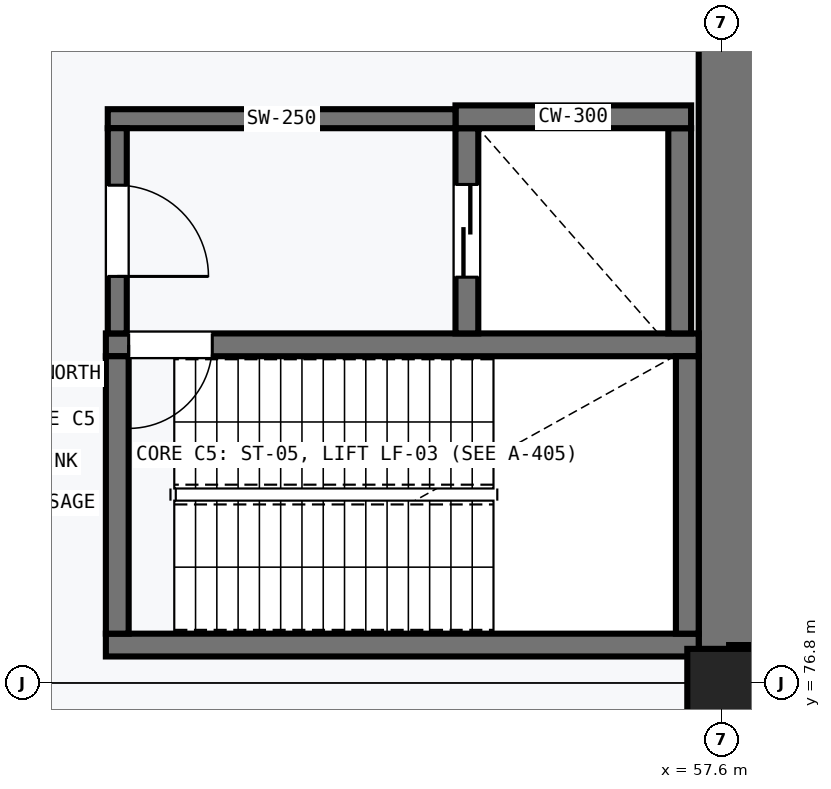
"""IFC4 building model, lengths in metres.
Left out: names, types, materials, properties, quantities, classifications, styles, units other than length and angle.
Written with IfcOpenShell. Run it as: python <this file> out.ifc"""

import sys

from ifc_helpers import new_model, si_unit, direction, frame, frame_2d, origin, origin_2d, place, context, subcontext, project, spatial, rectangle, extrude, element, fill, save


model = new_model("IFC4")
c1 = context("Model", 3, precision=1e-05, world=origin(), true_north=direction((0.0, 1.0)))
c2 = subcontext(c1, "Body", "Model", "MODEL_VIEW")
j1 = project(units=[si_unit("LENGTHUNIT", "METRE"), si_unit("PLANEANGLEUNIT", "RADIAN")], contexts=[c1])
p1 = place(None, origin())
s1 = spatial("IfcSite", under=j1, at=p1, CompositionType="ELEMENT")
p2 = place(p1, origin())
s2 = spatial("IfcBuilding", under=s1, at=p2, CompositionType="ELEMENT")
p3 = place(p2, frame((0.0, 0.0, -5.4)))
s3 = spatial("IfcBuildingStorey", under=s2, at=p3, CompositionType="ELEMENT", Elevation=-5.4)
p4 = place(p3, frame((57.7, 86.5, 0.0), z_axis=(0.0, 0.0, 1.0), x_axis=(0.0, -1.0, 0.0)))
e1 = element("IfcWall", 1, at=p4, inside=s3, PredefinedType="SOLIDWALL", context=c2, shape_type="SweptSolid", body=[
    extrude(rectangle(XDim=9.6, YDim=0.8, at=frame_2d((4.8, 0.0))), origin(), (0.0, 0.0, 1.0), 5.0),
])
p5 = place(p3, frame((57.7, 76.9, 0.0), z_axis=(0.0, 0.0, 1.0), x_axis=(1.0, 0.0, 0.0)))
e2 = element("IfcWall", 2, at=p5, inside=s3, PredefinedType="SOLIDWALL", context=c2, shape_type="SweptSolid", body=[
    extrude(rectangle(XDim=96.0, YDim=0.8, at=frame_2d((48.0, 0.0))), origin(), (0.0, 0.0, 1.0), 5.0),
])
p6 = place(p3, frame((57.6, 76.8, 0.0), z_axis=(0.0, 0.0, 1.0), x_axis=(1.0, 0.0, 0.0)))
e3 = element("IfcColumn", 3, at=p6, inside=s3, PredefinedType="COLUMN", context=c2, shape_type="SweptSolid", body=[
    extrude(rectangle(XDim=0.9, YDim=0.9, at=origin_2d()), origin(), (0.0, 0.0, 1.0), 5.0),
])
p7 = place(p3, frame((49.5, 77.3, 0.0), z_axis=(0.0, 0.0, 1.0), x_axis=(1.0, 0.0, 0.0)))
e4 = element("IfcWall", 4, at=p7, inside=s3, PredefinedType="SHEAR", context=c2, shape_type="SweptSolid", body=[
    extrude(rectangle(XDim=7.8, YDim=0.3, at=frame_2d((3.9, 0.0))), origin(), (0.0, 0.0, 1.0), 5.0),
])
p8 = place(p3, frame((57.3, 81.25, 0.0), z_axis=(0.0, 0.0, 1.0), x_axis=(-1.0, 0.0, 0.0)))
e5 = element("IfcWall", 5, at=p8, inside=s3, PredefinedType="SHEAR", context=c2, shape_type="SweptSolid", body=[
    extrude(rectangle(XDim=7.8, YDim=0.3, at=frame_2d((3.9, 0.0))), origin(), (0.0, 0.0, 1.0), 5.0),
])
p9 = place(p8, frame((6.4, 0.0, 0.0)))
e6 = element("IfcOpeningElement", 6, at=p9, cuts=e5, PredefinedType="OPENING", context=c2, shape_type="SweptSolid", body=[
    extrude(rectangle(XDim=1.1, YDim=2.15, at=frame_2d((0.55, 1.075))), frame((0.0, 0.16, 0.0), z_axis=(0.0, -1.0, 0.0), x_axis=(1.0, 0.0, 0.0)), (0.0, 0.0, 1.0), 0.32),
])
for number, where, z_axis, x_axis in (
    (7, (49.65, 77.45, 0.0), (0.0, 0.0, 1.0), (0.0, 1.0, 0.0)),
    (8, (57.15, 81.1, 0.0), (0.0, 0.0, 1.0), (0.0, -1.0, 0.0)),
):
    element("IfcWall", number, at=place(p3, frame(where, z_axis=z_axis, x_axis=x_axis)), inside=s3, PredefinedType="SHEAR", context=c2, shape_type="SweptSolid", body=[
        extrude(rectangle(XDim=3.65, YDim=0.3, at=frame_2d((1.825, 0.0))), origin(), (0.0, 0.0, 1.0), 5.0),
    ])
p10 = place(p3, frame((54.25, 84.1, 0.0), z_axis=(0.0, 0.0, 1.0), x_axis=(0.0, -1.0, 0.0)))
e9 = element("IfcWall", 9, at=p10, inside=s3, PredefinedType="SHEAR", context=c2, shape_type="SweptSolid", body=[
    extrude(rectangle(XDim=2.7, YDim=0.3, at=frame_2d((1.35, 0.0))), origin(), (0.0, 0.0, 1.0), 5.0),
])
p11 = place(p10, frame((0.74, 0.0, 0.0)))
e10 = element("IfcOpeningElement", 10, at=p11, cuts=e9, PredefinedType="OPENING", context=c2, shape_type="SweptSolid", body=[
    extrude(rectangle(XDim=1.22, YDim=2.15, at=frame_2d((0.61, 1.075))), frame((0.0, 0.16, 0.0), z_axis=(0.0, -1.0, 0.0), x_axis=(1.0, 0.0, 0.0)), (0.0, 0.0, 1.0), 0.32),
])
p12 = place(p3, frame((57.05, 81.4, 0.0), z_axis=(0.0, 0.0, 1.0), x_axis=(0.0, 1.0, 0.0)))
e11 = element("IfcWall", 11, at=p12, inside=s3, PredefinedType="SHEAR", context=c2, shape_type="SweptSolid", body=[
    extrude(rectangle(XDim=2.7, YDim=0.3, at=frame_2d((1.35, 0.0))), origin(), (0.0, 0.0, 1.0), 5.0),
])
p13 = place(p3, frame((54.1, 84.25, 0.0), z_axis=(0.0, 0.0, 1.0), x_axis=(1.0, 0.0, 0.0)))
e12 = element("IfcWall", 12, at=p13, inside=s3, PredefinedType="SHEAR", context=c2, shape_type="SweptSolid", body=[
    extrude(rectangle(XDim=3.1, YDim=0.3, at=frame_2d((1.55, 0.0))), origin(), (0.0, 0.0, 1.0), 5.0),
])
p14 = place(p3, frame((54.1, 84.225, 0.0), z_axis=(0.0, 0.0, 1.0), x_axis=(-1.0, 0.0, 0.0)))
e13 = element("IfcWall", 13, at=p14, inside=s3, PredefinedType="SHEAR", context=c2, shape_type="SweptSolid", body=[
    extrude(rectangle(XDim=4.575, YDim=0.25, at=frame_2d((2.288, 0.0))), origin(), (0.0, 0.0, 1.0), 5.0),
])
p15 = place(p3, frame((49.65, 81.4, 0.0), z_axis=(0.0, 0.0, 1.0), x_axis=(0.0, 1.0, 0.0)))
e14 = element("IfcWall", 14, at=p15, inside=s3, PredefinedType="SHEAR", context=c2, shape_type="SweptSolid", body=[
    extrude(rectangle(XDim=2.7, YDim=0.25, at=frame_2d((1.35, 0.0))), origin(), (0.0, 0.0, 1.0), 5.0),
])
p16 = place(p15, frame((0.75, 0.0, 0.0)))
e15 = element("IfcOpeningElement", 15, at=p16, cuts=e14, PredefinedType="OPENING", context=c2, shape_type="SweptSolid", body=[
    extrude(rectangle(XDim=1.2, YDim=2.15, at=frame_2d((0.6, 1.075))), frame((0.0, 0.135, 0.0), z_axis=(0.0, -1.0, 0.0), x_axis=(1.0, 0.0, 0.0)), (0.0, 0.0, 1.0), 0.27),
])
p17 = place(p9, origin())
e16 = element("IfcDoor", 16, at=p17, inside=s3, OperationType="SINGLE_SWING_RIGHT", PredefinedType="DOOR", context=c2, shape_type="SweptSolid", body=[
    extrude(rectangle(XDim=1.1, YDim=2.15, at=frame_2d((0.55, 1.075))), frame((0.0, 0.025, 0.0), z_axis=(0.0, -1.0, 0.0), x_axis=(1.0, 0.0, 0.0)), (0.0, 0.0, 1.0), 0.05),
])
fill(e6, e16)
p18 = place(p11, frame((1.22, 0.0, 0.0), z_axis=(0.0, 0.0, 1.0), x_axis=(-1.0, 0.0, 0.0)))
e17 = element("IfcDoor", 17, at=p18, inside=s3, OperationType="DOUBLE_DOOR_SLIDING", PredefinedType="DOOR", context=c2, shape_type="SweptSolid", body=[
    extrude(rectangle(XDim=1.22, YDim=2.15, at=frame_2d((0.61, 1.075))), frame((0.0, 0.025, 0.0), z_axis=(0.0, -1.0, 0.0), x_axis=(1.0, 0.0, 0.0)), (0.0, 0.0, 1.0), 0.05),
])
fill(e10, e17)
p19 = place(p16, frame((1.2, 0.0, 0.0), z_axis=(0.0, 0.0, 1.0), x_axis=(-1.0, 0.0, 0.0)))
e18 = element("IfcDoor", 18, at=p19, inside=s3, OperationType="SINGLE_SWING_LEFT", PredefinedType="DOOR", context=c2, shape_type="SweptSolid", body=[
    extrude(rectangle(XDim=1.2, YDim=2.15, at=frame_2d((0.6, 1.075))), frame((0.0, 0.025, 0.0), z_axis=(0.0, -1.0, 0.0), x_axis=(1.0, 0.0, 0.0)), (0.0, 0.0, 1.0), 0.05),
])
fill(e15, e18)
save(model, sys.argv[1])
